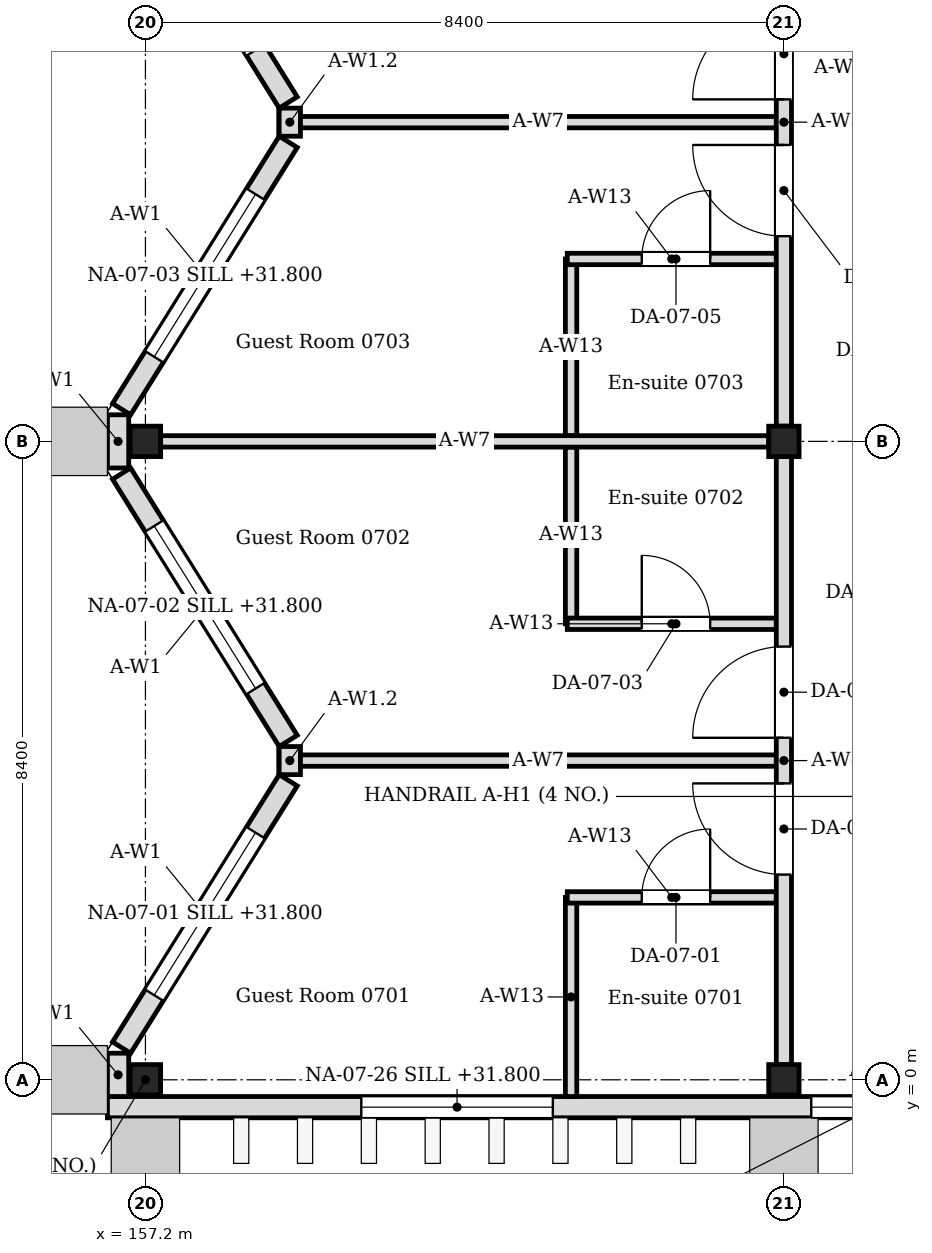
"""IFC4 building model, lengths in metres.
Left out: names, types, materials, properties, quantities, classifications, styles, units other than length and angle.
Written with IfcOpenShell. Run it as: python <this file> out.ifc"""

import sys

from ifc_helpers import new_model, si_unit, direction, frame, frame_2d, origin, origin_2d, place, context, subcontext, project, spatial, rectangle, i_section, extrude, element, fill, save


model = new_model("IFC4")
c1 = context("Model", 3, precision=1e-05, world=origin(), true_north=direction((0.0, 1.0)))
c2 = subcontext(c1, "Body", "Model", "MODEL_VIEW")
j1 = project(units=[si_unit("LENGTHUNIT", "METRE"), si_unit("PLANEANGLEUNIT", "RADIAN")], contexts=[c1])
p1 = place(None, origin())
s1 = spatial("IfcSite", under=j1, at=p1, CompositionType="ELEMENT")
p2 = place(p1, origin())
s2 = spatial("IfcBuilding", under=s1, at=p2, CompositionType="ELEMENT")
p3 = place(p2, frame((0.0, 0.0, 31.2)))
s3 = spatial("IfcBuildingStorey", under=s2, at=p3, CompositionType="ELEMENT", Elevation=31.2)
for number, where, z_axis, x_axis in (
    (1, (157.2, 0.0, 0.0), (0.0, 0.0, 1.0), (1.0, 0.0, 0.0)),
    (2, (157.2, 8.4, 0.0), (0.0, 0.0, 1.0), (1.0, 0.0, 0.0)),
    (3, (165.6, 0.0, 0.0), (0.0, 0.0, 1.0), (1.0, 0.0, 0.0)),
    (4, (165.6, 8.4, 0.0), (0.0, 0.0, 1.0), (1.0, 0.0, 0.0)),
):
    element("IfcColumn", number, at=place(p3, frame(where, z_axis=z_axis, x_axis=x_axis)), inside=s3, PredefinedType="COLUMN", context=c2, shape_type="SweptSolid", body=[
        extrude(i_section(OverallWidth=0.4, OverallDepth=0.4, WebThickness=0.013, FlangeThickness=0.021, FilletRadius=0.022, at=origin_2d()), origin(), (0.0, 0.0, 1.0), 4.2),
    ])
p4 = place(p3, frame((156.84, -0.22, 0.0), z_axis=(0.0, 0.0, 1.0), x_axis=(0.0, 1.0, 0.0)))
e5 = element("IfcWall", 5, at=p4, inside=s3, PredefinedType="SOLIDWALL", context=c2, shape_type="SweptSolid", body=[
    extrude(rectangle(XDim=0.57, YDim=0.28, at=frame_2d((0.285, 0.0))), origin(), (0.0, 0.0, 1.0), 4.05),
])
p5 = place(p3, frame((156.886, 0.424, 0.0), z_axis=(0.0, 0.0, 1.0), x_axis=(0.529018946142, 0.848610013271, 0.0)))
e6 = element("IfcWall", 6, at=p5, inside=s3, PredefinedType="SOLIDWALL", context=c2, shape_type="SweptSolid", body=[
    extrude(rectangle(XDim=4.144, YDim=0.28, at=frame_2d((2.072, 0.0))), origin(), (0.0, 0.0, 1.0), 4.05),
])
p6 = place(p5, frame((0.812, 0.0, 0.6)))
e7 = element("IfcOpeningElement", 7, at=p6, cuts=e6, PredefinedType="OPENING", context=c2, shape_type="SweptSolid", body=[
    extrude(rectangle(XDim=2.52, YDim=2.4, at=frame_2d((1.26, 1.2))), frame((0.0, 0.15, 0.0), z_axis=(0.0, -1.0, 0.0), x_axis=(1.0, 0.0, 0.0)), (0.0, 0.0, 1.0), 0.3),
])
p7 = place(p3, frame((159.079, 4.459, 0.0), z_axis=(0.0, 0.0, 1.0), x_axis=(-0.529018946142, 0.848610013271, 0.0)))
e8 = element("IfcWall", 8, at=p7, inside=s3, PredefinedType="SOLIDWALL", context=c2, shape_type="SweptSolid", body=[
    extrude(rectangle(XDim=4.144, YDim=0.28, at=frame_2d((2.072, 0.0))), origin(), (0.0, 0.0, 1.0), 4.05),
])
p8 = place(p7, frame((0.812, 0.0, 0.6)))
e9 = element("IfcOpeningElement", 9, at=p8, cuts=e8, PredefinedType="OPENING", context=c2, shape_type="SweptSolid", body=[
    extrude(rectangle(XDim=2.52, YDim=2.4, at=frame_2d((1.26, 1.2))), frame((0.0, 0.15, 0.0), z_axis=(0.0, -1.0, 0.0), x_axis=(1.0, 0.0, 0.0)), (0.0, 0.0, 1.0), 0.3),
])
p9 = place(p3, frame((159.1, 4.015, 0.0), z_axis=(0.0, 0.0, 1.0), x_axis=(0.0, 1.0, 0.0)))
e10 = element("IfcWall", 10, at=p9, inside=s3, PredefinedType="SOLIDWALL", context=c2, shape_type="SweptSolid", body=[
    extrude(rectangle(XDim=0.37, YDim=0.28, at=frame_2d((0.185, 0.0))), origin(), (0.0, 0.0, 1.0), 3.604),
])
p10 = place(p3, frame((156.84, 8.05, 0.0), z_axis=(0.0, 0.0, 1.0), x_axis=(0.0, 1.0, 0.0)))
e11 = element("IfcWall", 11, at=p10, inside=s3, PredefinedType="SOLIDWALL", context=c2, shape_type="SweptSolid", body=[
    extrude(rectangle(XDim=0.7, YDim=0.28, at=frame_2d((0.35, 0.0))), origin(), (0.0, 0.0, 1.0), 4.05),
])
p11 = place(p3, frame((156.886, 8.824, 0.0), z_axis=(0.0, 0.0, 1.0), x_axis=(0.529018946142, 0.848610013271, 0.0)))
e12 = element("IfcWall", 12, at=p11, inside=s3, PredefinedType="SOLIDWALL", context=c2, shape_type="SweptSolid", body=[
    extrude(rectangle(XDim=4.144, YDim=0.28, at=frame_2d((2.072, 0.0))), origin(), (0.0, 0.0, 1.0), 4.05),
])
p12 = place(p11, frame((0.812, 0.0, 0.6)))
e13 = element("IfcOpeningElement", 13, at=p12, cuts=e12, PredefinedType="OPENING", context=c2, shape_type="SweptSolid", body=[
    extrude(rectangle(XDim=2.52, YDim=2.4, at=frame_2d((1.26, 1.2))), frame((0.0, 0.15, 0.0), z_axis=(0.0, -1.0, 0.0), x_axis=(1.0, 0.0, 0.0)), (0.0, 0.0, 1.0), 0.3),
])
p13 = place(p3, frame((159.079, 12.859, 0.0), z_axis=(0.0, 0.0, 1.0), x_axis=(-0.528992500338, 0.848626498871, 0.0)))
e14 = element("IfcWall", 14, at=p13, inside=s3, PredefinedType="SOLIDWALL", context=c2, shape_type="SweptSolid", body=[
    extrude(rectangle(XDim=4.145, YDim=0.28, at=frame_2d((2.072, 0.0))), origin(), (0.0, 0.0, 1.0), 4.05),
])
p14 = place(p13, frame((0.812, 0.0, 0.6)))
e15 = element("IfcOpeningElement", 15, at=p14, cuts=e14, PredefinedType="OPENING", context=c2, shape_type="SweptSolid", body=[
    extrude(rectangle(XDim=2.52, YDim=2.4, at=frame_2d((1.26, 1.2))), frame((0.0, 0.15, 0.0), z_axis=(0.0, -1.0, 0.0), x_axis=(1.0, 0.0, 0.0)), (0.0, 0.0, 1.0), 0.3),
])
p15 = place(p3, frame((159.1, 12.415, 0.0), z_axis=(0.0, 0.0, 1.0), x_axis=(0.0, 1.0, 0.0)))
e16 = element("IfcWall", 16, at=p15, inside=s3, PredefinedType="SOLIDWALL", context=c2, shape_type="SweptSolid", body=[
    extrude(rectangle(XDim=0.37, YDim=0.28, at=frame_2d((0.185, 0.0))), origin(), (0.0, 0.0, 1.0), 3.604),
])
p16 = place(p3, frame((156.7, -0.36, 0.0), z_axis=(0.0, 0.0, 1.0), x_axis=(1.0, 0.0, 0.0)))
e17 = element("IfcWall", 17, at=p16, inside=s3, PredefinedType="SOLIDWALL", context=c2, shape_type="SweptSolid", body=[
    extrude(rectangle(XDim=20.2, YDim=0.28, at=frame_2d((10.1, 0.0))), origin(), (0.0, 0.0, 1.0), 4.05),
])
p17 = place(p16, frame((9.26, 0.0, 0.6)))
e18 = element("IfcOpeningElement", 18, at=p17, cuts=e17, PredefinedType="OPENING", context=c2, shape_type="SweptSolid", body=[
    extrude(rectangle(XDim=1.68, YDim=2.4, at=frame_2d((0.84, 1.2))), frame((0.0, 0.15, 0.0), z_axis=(0.0, -1.0, 0.0), x_axis=(1.0, 0.0, 0.0)), (0.0, 0.0, 1.0), 0.3),
])
p18 = place(p16, frame((3.34, 0.0, 0.6)))
e19 = element("IfcOpeningElement", 19, at=p18, cuts=e17, PredefinedType="OPENING", context=c2, shape_type="SweptSolid", body=[
    extrude(rectangle(XDim=2.52, YDim=2.4, at=frame_2d((1.26, 1.2))), frame((0.0, 0.15, 0.0), z_axis=(0.0, -1.0, 0.0), x_axis=(1.0, 0.0, 0.0)), (0.0, 0.0, 1.0), 0.3),
])
p19 = place(p3, frame((162.8, -0.22, 0.0), z_axis=(0.0, 0.0, 1.0), x_axis=(0.0, 1.0, 0.0)))
e20 = element("IfcWall", 20, at=p19, inside=s3, PredefinedType="PARTITIONING", context=c2, shape_type="SweptSolid", body=[
    extrude(rectangle(XDim=2.62, YDim=0.15, at=frame_2d((1.31, 0.0))), origin(), (0.0, 0.0, 1.0), 4.05),
])
p20 = place(p3, frame((162.75, 2.4, 0.0), z_axis=(0.0, 0.0, 1.0), x_axis=(1.0, 0.0, 0.0)))
e21 = element("IfcWall", 21, at=p20, inside=s3, PredefinedType="PARTITIONING", context=c2, shape_type="SweptSolid", body=[
    extrude(rectangle(XDim=2.75, YDim=0.15, at=frame_2d((1.375, 0.0))), origin(), (0.0, 0.0, 1.0), 4.05),
])
p21 = place(p20, frame((0.98, 0.0, 0.0)))
e22 = element("IfcOpeningElement", 22, at=p21, cuts=e21, PredefinedType="OPENING", context=c2, shape_type="SweptSolid", body=[
    extrude(rectangle(XDim=0.9, YDim=2.1, at=frame_2d((0.45, 1.05))), frame((0.0, 0.085, 0.0), z_axis=(0.0, -1.0, 0.0), x_axis=(1.0, 0.0, 0.0)), (0.0, 0.0, 1.0), 0.17),
])
p22 = place(p3, frame((162.8, 6.0, 0.0), z_axis=(0.0, 0.0, 1.0), x_axis=(0.0, 1.0, 0.0)))
e23 = element("IfcWall", 23, at=p22, inside=s3, PredefinedType="PARTITIONING", context=c2, shape_type="SweptSolid", body=[
    extrude(rectangle(XDim=2.325, YDim=0.15, at=frame_2d((1.163, 0.0))), origin(), (0.0, 0.0, 1.0), 4.05),
])
p23 = place(p3, frame((162.75, 6.0, 0.0), z_axis=(0.0, 0.0, 1.0), x_axis=(1.0, 0.0, 0.0)))
e24 = element("IfcWall", 24, at=p23, inside=s3, PredefinedType="PARTITIONING", context=c2, shape_type="SweptSolid", body=[
    extrude(rectangle(XDim=2.75, YDim=0.15, at=frame_2d((1.375, 0.0))), origin(), (0.0, 0.0, 1.0), 4.05),
])
p24 = place(p23, frame((0.98, 0.0, 0.0)))
e25 = element("IfcOpeningElement", 25, at=p24, cuts=e24, PredefinedType="OPENING", context=c2, shape_type="SweptSolid", body=[
    extrude(rectangle(XDim=0.9, YDim=2.1, at=frame_2d((0.45, 1.05))), frame((0.0, 0.085, 0.0), z_axis=(0.0, -1.0, 0.0), x_axis=(1.0, 0.0, 0.0)), (0.0, 0.0, 1.0), 0.17),
])
p25 = place(p3, frame((162.8, 8.475, 0.0), z_axis=(0.0, 0.0, 1.0), x_axis=(0.0, 1.0, 0.0)))
e26 = element("IfcWall", 26, at=p25, inside=s3, PredefinedType="PARTITIONING", context=c2, shape_type="SweptSolid", body=[
    extrude(rectangle(XDim=2.325, YDim=0.15, at=frame_2d((1.163, 0.0))), origin(), (0.0, 0.0, 1.0), 4.05),
])
p26 = place(p3, frame((162.75, 10.8, 0.0), z_axis=(0.0, 0.0, 1.0), x_axis=(1.0, 0.0, 0.0)))
e27 = element("IfcWall", 27, at=p26, inside=s3, PredefinedType="PARTITIONING", context=c2, shape_type="SweptSolid", body=[
    extrude(rectangle(XDim=2.75, YDim=0.15, at=frame_2d((1.375, 0.0))), origin(), (0.0, 0.0, 1.0), 4.05),
])
p27 = place(p26, frame((0.98, 0.0, 0.0)))
e28 = element("IfcOpeningElement", 28, at=p27, cuts=e27, PredefinedType="OPENING", context=c2, shape_type="SweptSolid", body=[
    extrude(rectangle(XDim=0.9, YDim=2.1, at=frame_2d((0.45, 1.05))), frame((0.0, 0.085, 0.0), z_axis=(0.0, -1.0, 0.0), x_axis=(1.0, 0.0, 0.0)), (0.0, 0.0, 1.0), 0.17),
])
p28 = place(p3, frame((157.4, 8.4, 0.0), z_axis=(0.0, 0.0, 1.0), x_axis=(1.0, 0.0, 0.0)))
e29 = element("IfcWall", 29, at=p28, inside=s3, PredefinedType="PARTITIONING", context=c2, shape_type="SweptSolid", body=[
    extrude(rectangle(XDim=8.0, YDim=0.15, at=frame_2d((4.0, 0.0))), origin(), (0.0, 0.0, 1.0), 3.604),
])
for number, where, z_axis, x_axis in (
    (30, (159.24, 4.2, 0.0), (0.0, 0.0, 1.0), (1.0, 0.0, 0.0)),
    (31, (159.24, 12.6, 0.0), (0.0, 0.0, 1.0), (1.0, 0.0, 0.0)),
):
    element("IfcWall", number, at=place(p3, frame(where, z_axis=z_axis, x_axis=x_axis)), inside=s3, PredefinedType="PARTITIONING", context=c2, shape_type="SweptSolid", body=[
        extrude(rectangle(XDim=6.26, YDim=0.15, at=frame_2d((3.13, 0.0))), origin(), (0.0, 0.0, 1.0), 3.604),
    ])
p29 = place(p3, frame((165.6, 0.2, 0.0), z_axis=(0.0, 0.0, 1.0), x_axis=(0.0, 1.0, 0.0)))
e32 = element("IfcWall", 32, at=p29, inside=s3, PredefinedType="PARTITIONING", context=c2, shape_type="SweptSolid", body=[
    extrude(rectangle(XDim=8.0, YDim=0.2, at=frame_2d((4.0, 0.0))), origin(), (0.0, 0.0, 1.0), 3.45),
])
p30 = place(p29, frame((2.5, 0.0, 0.0)))
e33 = element("IfcOpeningElement", 33, at=p30, cuts=e32, PredefinedType="OPENING", context=c2, shape_type="SweptSolid", body=[
    extrude(rectangle(XDim=1.2, YDim=2.1, at=frame_2d((0.6, 1.05))), frame((0.0, 0.11, 0.0), z_axis=(0.0, -1.0, 0.0), x_axis=(1.0, 0.0, 0.0)), (0.0, 0.0, 1.0), 0.22),
])
p31 = place(p29, frame((4.3, 0.0, 0.0)))
e34 = element("IfcOpeningElement", 34, at=p31, cuts=e32, PredefinedType="OPENING", context=c2, shape_type="SweptSolid", body=[
    extrude(rectangle(XDim=1.2, YDim=2.1, at=frame_2d((0.6, 1.05))), frame((0.0, 0.11, 0.0), z_axis=(0.0, -1.0, 0.0), x_axis=(1.0, 0.0, 0.0)), (0.0, 0.0, 1.0), 0.22),
])
p32 = place(p3, frame((165.6, 8.6, 0.0), z_axis=(0.0, 0.0, 1.0), x_axis=(0.0, 1.0, 0.0)))
e35 = element("IfcWall", 35, at=p32, inside=s3, PredefinedType="PARTITIONING", context=c2, shape_type="SweptSolid", body=[
    extrude(rectangle(XDim=8.0, YDim=0.2, at=frame_2d((4.0, 0.0))), origin(), (0.0, 0.0, 1.0), 3.45),
])
p33 = place(p32, frame((2.5, 0.0, 0.0)))
e36 = element("IfcOpeningElement", 36, at=p33, cuts=e35, PredefinedType="OPENING", context=c2, shape_type="SweptSolid", body=[
    extrude(rectangle(XDim=1.2, YDim=2.1, at=frame_2d((0.6, 1.05))), frame((0.0, 0.11, 0.0), z_axis=(0.0, -1.0, 0.0), x_axis=(1.0, 0.0, 0.0)), (0.0, 0.0, 1.0), 0.22),
])
p34 = place(p32, frame((4.3, 0.0, 0.0)))
e37 = element("IfcOpeningElement", 37, at=p34, cuts=e35, PredefinedType="OPENING", context=c2, shape_type="SweptSolid", body=[
    extrude(rectangle(XDim=1.2, YDim=2.1, at=frame_2d((0.6, 1.05))), frame((0.0, 0.11, 0.0), z_axis=(0.0, -1.0, 0.0), x_axis=(1.0, 0.0, 0.0)), (0.0, 0.0, 1.0), 0.22),
])
p35 = place(p6, origin())
e38 = element("IfcWindow", 38, at=p35, inside=s3, PartitioningType="SINGLE_PANEL", PredefinedType="WINDOW", context=c2, shape_type="SweptSolid", body=[
    extrude(rectangle(XDim=2.52, YDim=2.4, at=frame_2d((1.26, 1.2))), frame((0.0, 0.03, 0.0), z_axis=(0.0, -1.0, 0.0), x_axis=(1.0, 0.0, 0.0)), (0.0, 0.0, 1.0), 0.06),
])
fill(e7, e38)
p36 = place(p8, origin())
e39 = element("IfcWindow", 39, at=p36, inside=s3, PartitioningType="SINGLE_PANEL", PredefinedType="WINDOW", context=c2, shape_type="SweptSolid", body=[
    extrude(rectangle(XDim=2.52, YDim=2.4, at=frame_2d((1.26, 1.2))), frame((0.0, 0.03, 0.0), z_axis=(0.0, -1.0, 0.0), x_axis=(1.0, 0.0, 0.0)), (0.0, 0.0, 1.0), 0.06),
])
fill(e9, e39)
p37 = place(p12, origin())
e40 = element("IfcWindow", 40, at=p37, inside=s3, PartitioningType="SINGLE_PANEL", PredefinedType="WINDOW", context=c2, shape_type="SweptSolid", body=[
    extrude(rectangle(XDim=2.52, YDim=2.4, at=frame_2d((1.26, 1.2))), frame((0.0, 0.03, 0.0), z_axis=(0.0, -1.0, 0.0), x_axis=(1.0, 0.0, 0.0)), (0.0, 0.0, 1.0), 0.06),
])
fill(e13, e40)
p38 = place(p17, origin())
e41 = element("IfcWindow", 41, at=p38, inside=s3, PartitioningType="SINGLE_PANEL", PredefinedType="WINDOW", context=c2, shape_type="SweptSolid", body=[
    extrude(rectangle(XDim=1.68, YDim=2.4, at=frame_2d((0.84, 1.2))), frame((0.0, 0.03, 0.0), z_axis=(0.0, -1.0, 0.0), x_axis=(1.0, 0.0, 0.0)), (0.0, 0.0, 1.0), 0.06),
])
fill(e18, e41)
p39 = place(p18, origin())
e42 = element("IfcWindow", 42, at=p39, inside=s3, PartitioningType="SINGLE_PANEL", PredefinedType="WINDOW", context=c2, shape_type="SweptSolid", body=[
    extrude(rectangle(XDim=2.52, YDim=2.4, at=frame_2d((1.26, 1.2))), frame((0.0, 0.03, 0.0), z_axis=(0.0, -1.0, 0.0), x_axis=(1.0, 0.0, 0.0)), (0.0, 0.0, 1.0), 0.06),
])
fill(e19, e42)
p40 = place(p21, origin())
e43 = element("IfcDoor", 43, at=p40, inside=s3, OperationType="SINGLE_SWING_RIGHT", PredefinedType="DOOR", context=c2, shape_type="SweptSolid", body=[
    extrude(rectangle(XDim=0.9, YDim=2.1, at=frame_2d((0.45, 1.05))), frame((0.0, 0.025, 0.0), z_axis=(0.0, -1.0, 0.0), x_axis=(1.0, 0.0, 0.0)), (0.0, 0.0, 1.0), 0.05),
])
fill(e22, e43)
p41 = place(p30, origin())
e44 = element("IfcDoor", 44, at=p41, inside=s3, OperationType="SINGLE_SWING_RIGHT", PredefinedType="DOOR", context=c2, shape_type="SweptSolid", body=[
    extrude(rectangle(XDim=1.2, YDim=2.1, at=frame_2d((0.6, 1.05))), frame((0.0, 0.025, 0.0), z_axis=(0.0, -1.0, 0.0), x_axis=(1.0, 0.0, 0.0)), (0.0, 0.0, 1.0), 0.05),
])
fill(e33, e44)
p42 = place(p24, origin())
e45 = element("IfcDoor", 45, at=p42, inside=s3, OperationType="SINGLE_SWING_LEFT", PredefinedType="DOOR", context=c2, shape_type="SweptSolid", body=[
    extrude(rectangle(XDim=0.9, YDim=2.1, at=frame_2d((0.45, 1.05))), frame((0.0, 0.025, 0.0), z_axis=(0.0, -1.0, 0.0), x_axis=(1.0, 0.0, 0.0)), (0.0, 0.0, 1.0), 0.05),
])
fill(e25, e45)
p43 = place(p31, origin())
e46 = element("IfcDoor", 46, at=p43, inside=s3, OperationType="SINGLE_SWING_LEFT", PredefinedType="DOOR", context=c2, shape_type="SweptSolid", body=[
    extrude(rectangle(XDim=1.2, YDim=2.1, at=frame_2d((0.6, 1.05))), frame((0.0, 0.025, 0.0), z_axis=(0.0, -1.0, 0.0), x_axis=(1.0, 0.0, 0.0)), (0.0, 0.0, 1.0), 0.05),
])
fill(e34, e46)
p44 = place(p27, origin())
e47 = element("IfcDoor", 47, at=p44, inside=s3, OperationType="SINGLE_SWING_RIGHT", PredefinedType="DOOR", context=c2, shape_type="SweptSolid", body=[
    extrude(rectangle(XDim=0.9, YDim=2.1, at=frame_2d((0.45, 1.05))), frame((0.0, 0.025, 0.0), z_axis=(0.0, -1.0, 0.0), x_axis=(1.0, 0.0, 0.0)), (0.0, 0.0, 1.0), 0.05),
])
fill(e28, e47)
p45 = place(p33, origin())
e48 = element("IfcDoor", 48, at=p45, inside=s3, OperationType="SINGLE_SWING_RIGHT", PredefinedType="DOOR", context=c2, shape_type="SweptSolid", body=[
    extrude(rectangle(XDim=1.2, YDim=2.1, at=frame_2d((0.6, 1.05))), frame((0.0, 0.025, 0.0), z_axis=(0.0, -1.0, 0.0), x_axis=(1.0, 0.0, 0.0)), (0.0, 0.0, 1.0), 0.05),
])
fill(e36, e48)
p46 = place(p34, origin())
e49 = element("IfcDoor", 49, at=p46, inside=s3, OperationType="SINGLE_SWING_LEFT", PredefinedType="DOOR", context=c2, shape_type="SweptSolid", body=[
    extrude(rectangle(XDim=1.2, YDim=2.1, at=frame_2d((0.6, 1.05))), frame((0.0, 0.025, 0.0), z_axis=(0.0, -1.0, 0.0), x_axis=(1.0, 0.0, 0.0)), (0.0, 0.0, 1.0), 0.05),
])
fill(e37, e49)
save(model, sys.argv[1])
